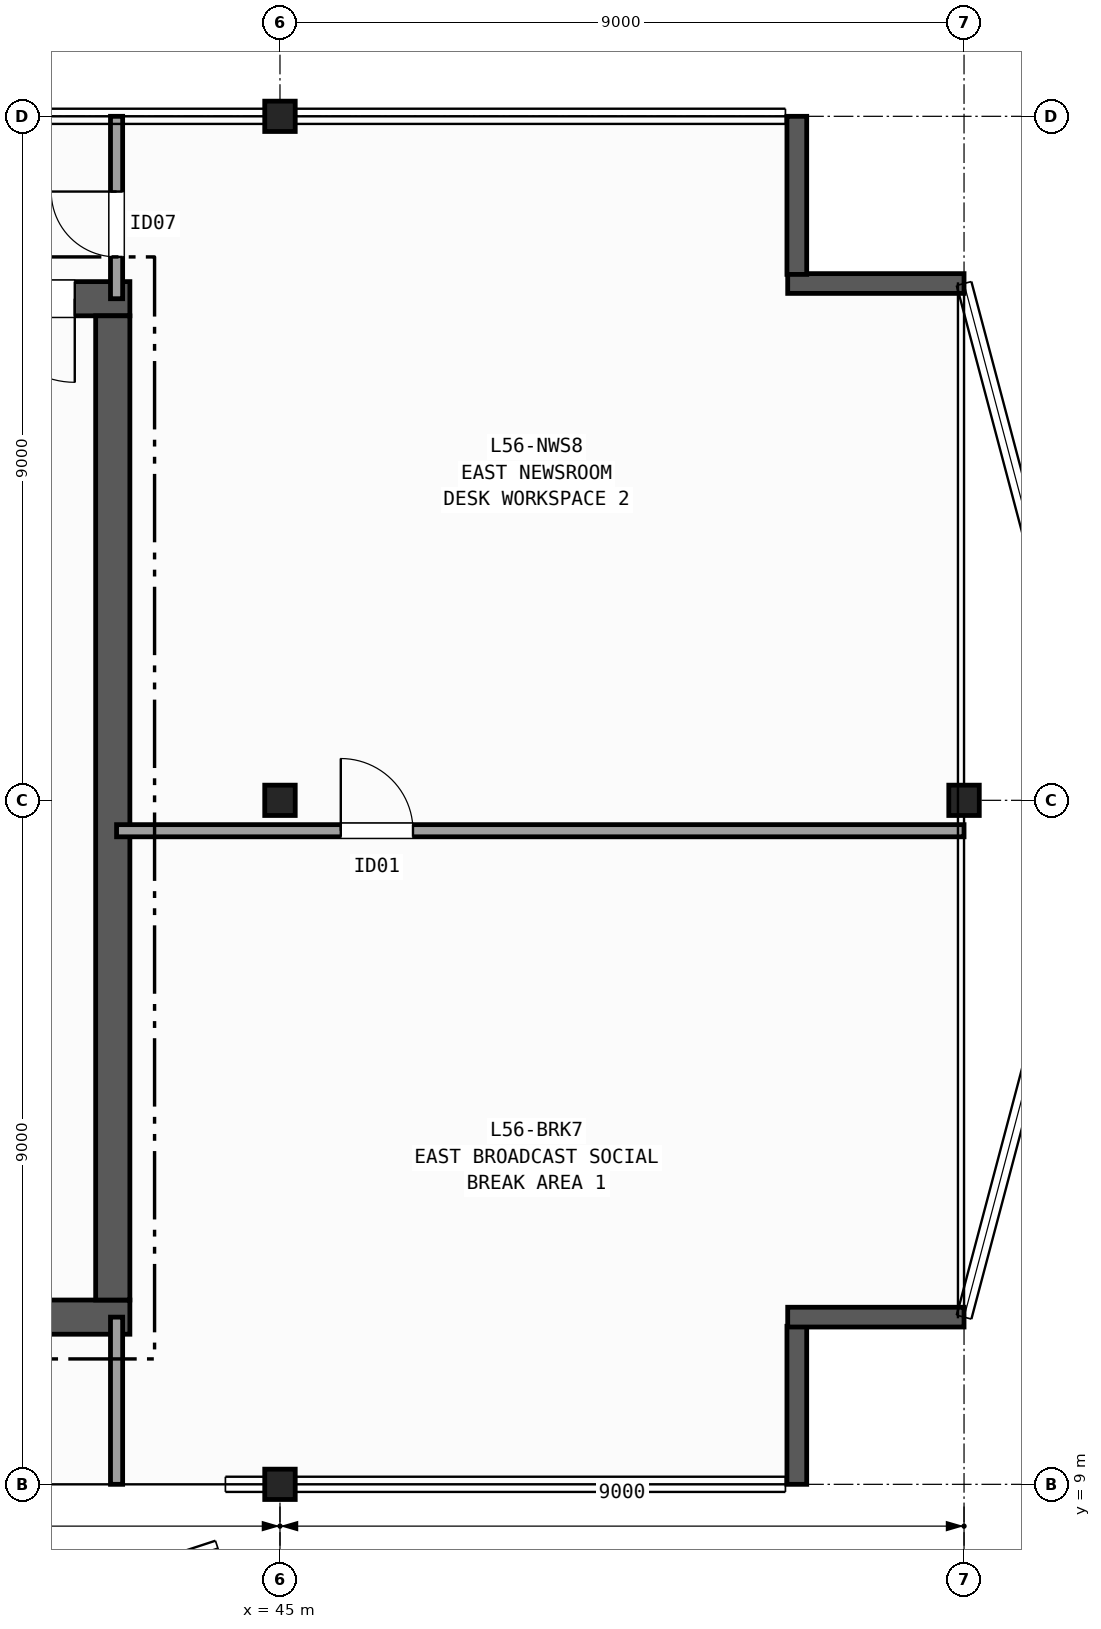
"""IFC4 building model, lengths in metres.
Left out: names, types, materials, properties, quantities, classifications, styles, units other than length and angle.
Written with IfcOpenShell. Run it as: python <this file> out.ifc"""

import sys

from ifc_helpers import new_model, si_unit, direction, frame, frame_2d, origin, origin_2d, place, context, subcontext, project, spatial, rectangle, i_section, extrude, element, fill, save


model = new_model("IFC4")
c1 = context("Model", 3, precision=1e-05, world=origin(), true_north=direction((0.0, 1.0)))
c2 = subcontext(c1, "Body", "Model", "MODEL_VIEW")
j1 = project(units=[si_unit("LENGTHUNIT", "METRE"), si_unit("PLANEANGLEUNIT", "RADIAN")], contexts=[c1])
p1 = place(None, origin())
s1 = spatial("IfcSite", under=j1, at=p1, CompositionType="ELEMENT")
p2 = place(p1, origin())
s2 = spatial("IfcBuilding", under=s1, at=p2, CompositionType="ELEMENT")
p3 = place(p2, frame((0.0, 0.0, 224.7)))
s3 = spatial("IfcBuildingStorey", under=s2, at=p3, CompositionType="ELEMENT", Elevation=224.7)
for number, where, z_axis, x_axis in (
    (1, (45.0, 9.0, 0.0), (0.0, 0.0, 1.0), (1.0, 0.0, 0.0)),
    (2, (45.0, 18.0, 0.0), (0.0, 0.0, 1.0), (1.0, 0.0, 0.0)),
    (3, (45.0, 27.0, 0.0), (0.0, 0.0, 1.0), (1.0, 0.0, 0.0)),
    (4, (54.0, 18.0, 0.0), (0.0, 0.0, 1.0), (1.0, 0.0, 0.0)),
):
    element("IfcColumn", number, at=place(p3, frame(where, z_axis=z_axis, x_axis=x_axis)), inside=s3, PredefinedType="COLUMN", context=c2, shape_type="SweptSolid", body=[
        extrude(i_section(OverallWidth=0.401, OverallDepth=0.399, WebThickness=0.025, FlangeThickness=0.04, FilletRadius=0.015, at=origin_2d()), origin(), (0.0, 0.0, 1.0), 3.7),
    ])
p4 = place(p3, frame((51.8, 9.0, 0.0), z_axis=(0.0, 0.0, 1.0), x_axis=(0.0, 1.0, 0.0)))
e5 = element("IfcWall", 5, at=p4, inside=s3, PredefinedType="SOLIDWALL", context=c2, shape_type="SweptSolid", body=[
    extrude(rectangle(XDim=2.08, YDim=0.26, at=frame_2d((1.04, 0.0))), origin(), (0.0, 0.0, 1.0), 3.42),
])
for number, where, z_axis, x_axis in (
    (6, (51.68, 11.2, 0.0), (0.0, 0.0, 1.0), (1.0, 0.0, 0.0)),
    (7, (54.0, 24.8, 0.0), (0.0, 0.0, 1.0), (-1.0, 0.0, 0.0)),
):
    element("IfcWall", number, at=place(p3, frame(where, z_axis=z_axis, x_axis=x_axis)), inside=s3, PredefinedType="SOLIDWALL", context=c2, shape_type="SweptSolid", body=[
        extrude(rectangle(XDim=2.32, YDim=0.26, at=frame_2d((1.16, 0.0))), origin(), (0.0, 0.0, 1.0), 3.42),
    ])
p5 = place(p3, frame((51.8, 24.92, 0.0), z_axis=(0.0, 0.0, 1.0), x_axis=(0.0, 1.0, 0.0)))
e8 = element("IfcWall", 8, at=p5, inside=s3, PredefinedType="SOLIDWALL", context=c2, shape_type="SweptSolid", body=[
    extrude(rectangle(XDim=2.08, YDim=0.26, at=frame_2d((1.04, 0.0))), origin(), (0.0, 0.0, 1.0), 3.42),
])
p6 = place(p3, frame((29.175, 11.2, 0.0), z_axis=(0.0, 0.0, 1.0), x_axis=(1.0, 0.0, 0.0)))
e9 = element("IfcWall", 9, at=p6, inside=s3, PredefinedType="SHEAR", context=c2, shape_type="SweptSolid", body=[
    extrude(rectangle(XDim=13.85, YDim=0.45, at=frame_2d((6.925, 0.0))), origin(), (0.0, 0.0, 1.0), 3.42),
])
p7 = place(p3, frame((43.025, 24.6, 0.0), z_axis=(0.0, 0.0, 1.0), x_axis=(-1.0, 0.0, 0.0)))
e10 = element("IfcWall", 10, at=p7, inside=s3, PredefinedType="SHEAR", context=c2, shape_type="SweptSolid", body=[
    extrude(rectangle(XDim=13.85, YDim=0.45, at=frame_2d((6.925, 0.0))), origin(), (0.0, 0.0, 1.0), 3.42),
])
p8 = place(p7, frame((0.725, 0.0, 0.0)))
e11 = element("IfcOpeningElement", 11, at=p8, cuts=e10, PredefinedType="OPENING", context=c2, shape_type="SweptSolid", body=[
    extrude(rectangle(XDim=1.1, YDim=2.15, at=frame_2d((0.55, 1.075))), frame((0.0, 0.235, 0.0), z_axis=(0.0, -1.0, 0.0), x_axis=(1.0, 0.0, 0.0)), (0.0, 0.0, 1.0), 0.47),
])
p9 = place(p7, frame((2.225, 0.0, 0.0)))
e12 = element("IfcOpeningElement", 12, at=p9, cuts=e10, PredefinedType="OPENING", context=c2, shape_type="SweptSolid", body=[
    extrude(rectangle(XDim=0.9, YDim=2.1, at=frame_2d((0.45, 1.05))), frame((0.0, 0.235, 0.0), z_axis=(0.0, -1.0, 0.0), x_axis=(1.0, 0.0, 0.0)), (0.0, 0.0, 1.0), 0.47),
])
p10 = place(p7, frame((3.525, 0.0, 0.0)))
e13 = element("IfcOpeningElement", 13, at=p10, cuts=e10, PredefinedType="OPENING", context=c2, shape_type="SweptSolid", body=[
    extrude(rectangle(XDim=0.9, YDim=2.1, at=frame_2d((0.45, 1.05))), frame((0.0, 0.235, 0.0), z_axis=(0.0, -1.0, 0.0), x_axis=(1.0, 0.0, 0.0)), (0.0, 0.0, 1.0), 0.47),
])
p11 = place(p7, frame((4.875, 0.0, 0.0)))
e14 = element("IfcOpeningElement", 14, at=p11, cuts=e10, PredefinedType="OPENING", context=c2, shape_type="SweptSolid", body=[
    extrude(rectangle(XDim=0.9, YDim=2.1, at=frame_2d((0.45, 1.05))), frame((0.0, 0.235, 0.0), z_axis=(0.0, -1.0, 0.0), x_axis=(1.0, 0.0, 0.0)), (0.0, 0.0, 1.0), 0.47),
])
p12 = place(p3, frame((42.8, 11.425, 0.0), z_axis=(0.0, 0.0, 1.0), x_axis=(0.0, 1.0, 0.0)))
e15 = element("IfcWall", 15, at=p12, inside=s3, PredefinedType="SHEAR", context=c2, shape_type="SweptSolid", body=[
    extrude(rectangle(XDim=12.95, YDim=0.45, at=frame_2d((6.475, 0.0))), origin(), (0.0, 0.0, 1.0), 3.42),
])
p13 = place(p3, frame((42.85, 9.0, 0.0), z_axis=(0.0, 0.0, 1.0), x_axis=(0.0, 1.0, 0.0)))
e16 = element("IfcWall", 16, at=p13, inside=s3, PredefinedType="PARTITIONING", context=c2, shape_type="SweptSolid", body=[
    extrude(rectangle(XDim=2.2, YDim=0.16, at=frame_2d((1.1, 0.0))), origin(), (0.0, 0.0, 1.0), 2.707),
])
p14 = place(p3, frame((42.85, 24.6, 0.0), z_axis=(0.0, 0.0, 1.0), x_axis=(0.0, 1.0, 0.0)))
e17 = element("IfcWall", 17, at=p14, inside=s3, PredefinedType="PARTITIONING", context=c2, shape_type="SweptSolid", body=[
    extrude(rectangle(XDim=2.4, YDim=0.16, at=frame_2d((1.2, 0.0))), origin(), (0.0, 0.0, 1.0), 2.707),
])
p15 = place(p14, frame((0.55, 0.0, 0.0)))
e18 = element("IfcOpeningElement", 18, at=p15, cuts=e17, PredefinedType="OPENING", context=c2, shape_type="SweptSolid", body=[
    extrude(rectangle(XDim=0.86, YDim=2.05, at=frame_2d((0.43, 1.025))), frame((0.0, 0.09, 0.0), z_axis=(0.0, -1.0, 0.0), x_axis=(1.0, 0.0, 0.0)), (0.0, 0.0, 1.0), 0.18),
])
p16 = place(p3, frame((42.85, 17.6, 0.0), z_axis=(0.0, 0.0, 1.0), x_axis=(1.0, 0.0, 0.0)))
e19 = element("IfcWall", 19, at=p16, inside=s3, PredefinedType="PARTITIONING", context=c2, shape_type="SweptSolid", body=[
    extrude(rectangle(XDim=11.15, YDim=0.16, at=frame_2d((5.575, 0.0))), origin(), (0.0, 0.0, 1.0), 3.42),
])
p17 = place(p16, frame((2.95, 0.0, 0.0)))
e20 = element("IfcOpeningElement", 20, at=p17, cuts=e19, PredefinedType="OPENING", context=c2, shape_type="SweptSolid", body=[
    extrude(rectangle(XDim=0.95, YDim=2.1, at=frame_2d((0.475, 1.05))), frame((0.0, 0.09, 0.0), z_axis=(0.0, -1.0, 0.0), x_axis=(1.0, 0.0, 0.0)), (0.0, 0.0, 1.0), 0.18),
])
p18 = place(p8, origin())
e21 = element("IfcDoor", 21, at=p18, inside=s3, OperationType="SINGLE_SWING_LEFT", PredefinedType="DOOR", context=c2, shape_type="SweptSolid", body=[
    extrude(rectangle(XDim=1.1, YDim=2.15, at=frame_2d((0.55, 1.075))), frame((0.0, 0.025, 0.0), z_axis=(0.0, -1.0, 0.0), x_axis=(1.0, 0.0, 0.0)), (0.0, 0.0, 1.0), 0.05),
])
fill(e11, e21)
p19 = place(p15, origin())
e22 = element("IfcDoor", 22, at=p19, inside=s3, OperationType="SINGLE_SWING_RIGHT", PredefinedType="DOOR", context=c2, shape_type="SweptSolid", body=[
    extrude(rectangle(XDim=0.86, YDim=2.05, at=frame_2d((0.43, 1.025))), frame((0.0, 0.025, 0.0), z_axis=(0.0, -1.0, 0.0), x_axis=(1.0, 0.0, 0.0)), (0.0, 0.0, 1.0), 0.05),
])
fill(e18, e22)
p20 = place(p17, origin())
e23 = element("IfcDoor", 23, at=p20, inside=s3, OperationType="SINGLE_SWING_LEFT", PredefinedType="DOOR", context=c2, shape_type="SweptSolid", body=[
    extrude(rectangle(XDim=0.95, YDim=2.1, at=frame_2d((0.475, 1.05))), frame((0.0, 0.025, 0.0), z_axis=(0.0, -1.0, 0.0), x_axis=(1.0, 0.0, 0.0)), (0.0, 0.0, 1.0), 0.05),
])
fill(e20, e23)
save(model, sys.argv[1])
